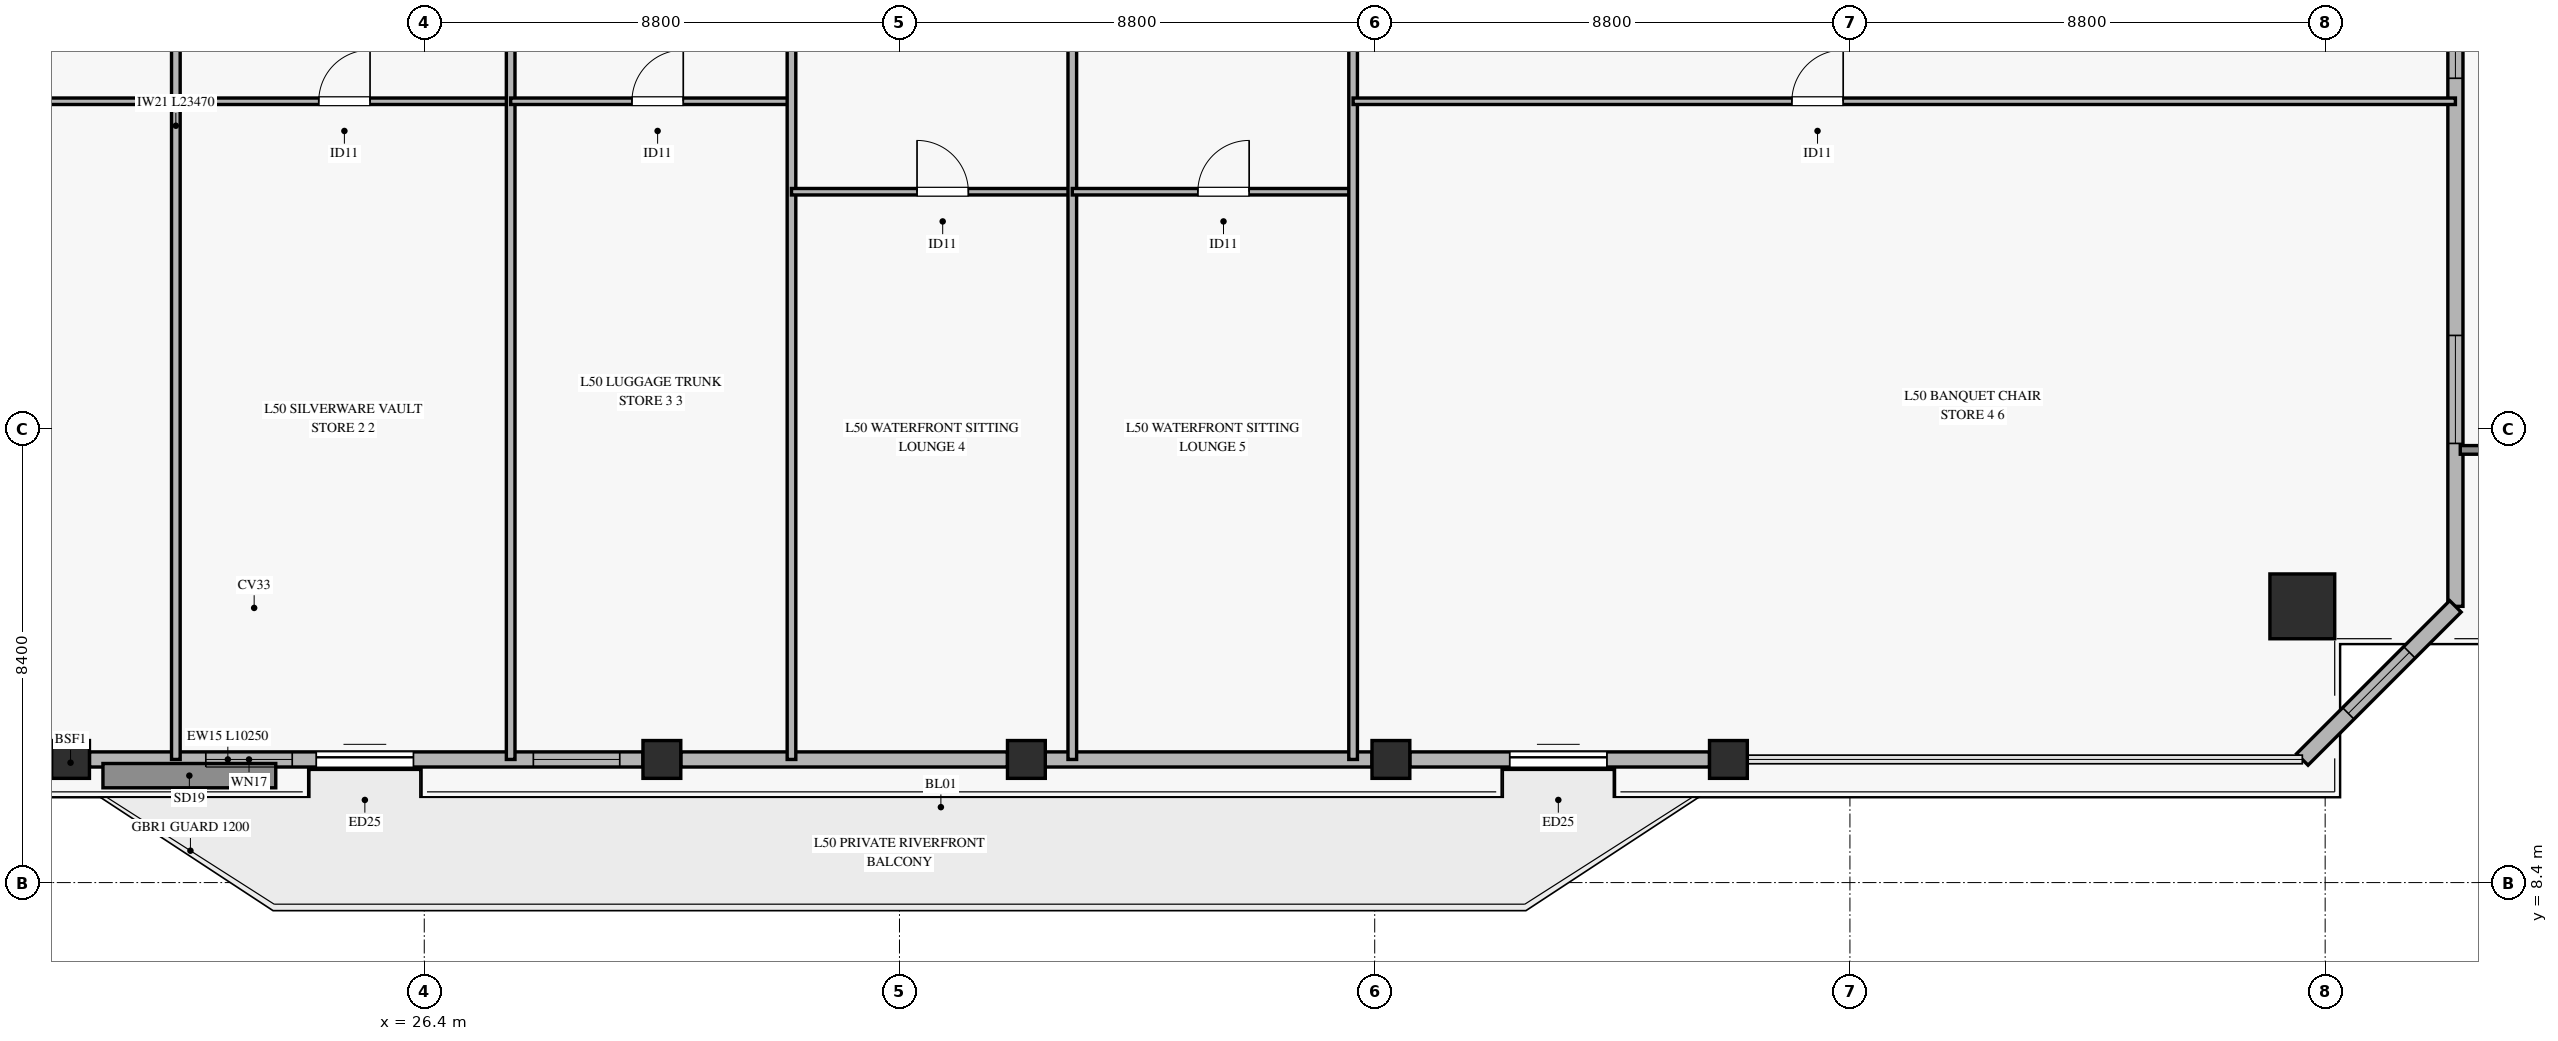
"""IFC4 building model, lengths in metres.
Left out: names, types, materials, properties, quantities, classifications, styles, units other than length and angle.
Written with IfcOpenShell. Run it as: python <this file> out.ifc"""

import sys

from ifc_helpers import new_model, si_unit, direction, frame, frame_2d, origin, origin_2d, place, context, subcontext, project, spatial, rectangle, hollow_rectangle, extrude, source, transform, mapped, element, fill, save


model = new_model("IFC4")
c1 = context("Model", 3, precision=1e-05, world=origin(), true_north=direction((0.0, 1.0)))
c2 = subcontext(c1, "Body", "Model", "MODEL_VIEW")
j1 = project(units=[si_unit("LENGTHUNIT", "METRE"), si_unit("PLANEANGLEUNIT", "RADIAN")], contexts=[c1])
p1 = place(None, origin())
s1 = spatial("IfcSite", under=j1, at=p1, CompositionType="ELEMENT")
p2 = place(p1, origin())
s2 = spatial("IfcBuilding", under=s1, at=p2, CompositionType="ELEMENT")
p3 = place(p2, frame((0.0, 0.0, 199.2)))
s3 = spatial("IfcBuildingStorey", under=s2, at=p3, CompositionType="ELEMENT", Elevation=199.2)
m1 = source(origin(), c2, "Body", "SweptSolid", [
    extrude(hollow_rectangle(XDim=1.2, YDim=1.2, WallThickness=0.055, at=origin_2d()), origin(), (0.0, 0.0, 1.0), 3.35),
])
p4 = place(p3, frame((61.177, 13.515, 0.0), z_axis=(-0.08330366427, 0.200351507504, 0.97617609731), x_axis=(-0.923364854607, -0.383923619067, 0.0)))
e1 = element("IfcColumn", 1, at=p4, inside=s3, PredefinedType="COLUMN", context=c2, shape_type="MappedRepresentation", body=[
    mapped(m1, transform((0.0, 0.0, 0.0), x_axis=(1.0, 0.0, 0.0), y_axis=(0.0, 1.0, 0.0), z_axis=(0.0, 0.0, 1.0), scale=1.0)),
])
m2 = source(origin(), c2, "Body", "SweptSolid", [
    extrude(hollow_rectangle(XDim=0.7, YDim=0.7, WallThickness=0.032, at=origin_2d()), origin(), (0.0, 0.0, 1.0), 3.345),
])
for number, where, z_axis, x_axis in (
    (2, (19.85, 10.68, 0.0), (0.0, 0.211, 0.977), (-1.0, 0.0, 0.0)),
    (3, (30.8, 10.68, 0.0), (0.0, 0.211, 0.977), (-1.0, 0.0, 0.0)),
    (4, (37.55, 10.68, 0.0), (0.0, 0.211, 0.977), (-1.0, 0.0, 0.0)),
    (5, (44.3, 10.68, 0.0), (0.0, 0.211, 0.977), (-1.0, 0.0, 0.0)),
    (6, (50.55, 10.68, 0.0), (0.0, 0.211, 0.977), (-1.0, 0.0, 0.0)),
):
    element("IfcColumn", number, at=place(p3, frame(where, z_axis=z_axis, x_axis=x_axis)), inside=s3, PredefinedType="COLUMN", context=c2, shape_type="MappedRepresentation", body=[
        mapped(m2, transform((0.0, 0.0, 0.0), x_axis=(1.0, 0.0, 0.0), y_axis=(0.0, 1.0, 0.0), z_axis=(0.0, 0.0, 1.0), scale=1.0)),
    ])
p5 = place(p3, frame((20.2, 10.68, 0.0), z_axis=(0.0, 0.0, 1.0), x_axis=(1.0, 0.0, 0.0)))
e7 = element("IfcWall", 7, at=p5, inside=s3, PredefinedType="SOLIDWALL", context=c2, shape_type="SweptSolid", body=[
    extrude(rectangle(XDim=10.25, YDim=0.28, at=frame_2d((5.125, 0.0))), origin(), (0.0, 0.0, 1.0), 2.75),
])
p6 = place(p5, frame((4.2, 0.0, 0.0)))
e8 = element("IfcOpeningElement", 8, at=p6, cuts=e7, PredefinedType="OPENING", context=c2, shape_type="SweptSolid", body=[
    extrude(rectangle(XDim=1.8, YDim=2.25, at=frame_2d((0.9, 1.125))), frame((0.0, 0.15, 0.0), z_axis=(0.0, -1.0, 0.0), x_axis=(1.0, 0.0, 0.0)), (0.0, 0.0, 1.0), 0.3),
])
p7 = place(p5, frame((2.155, 0.0, 0.45)))
e9 = element("IfcOpeningElement", 9, at=p7, cuts=e7, PredefinedType="OPENING", context=c2, shape_type="SweptSolid", body=[
    extrude(rectangle(XDim=1.6, YDim=2.0, at=frame_2d((0.8, 1.0))), frame((0.0, 0.15, 0.0), z_axis=(0.0, -1.0, 0.0), x_axis=(1.0, 0.0, 0.0)), (0.0, 0.0, 1.0), 0.3),
])
p8 = place(p5, frame((8.22, 0.0, 0.45)))
e10 = element("IfcOpeningElement", 10, at=p8, cuts=e7, PredefinedType="OPENING", context=c2, shape_type="SweptSolid", body=[
    extrude(rectangle(XDim=1.6, YDim=2.0, at=frame_2d((0.8, 1.0))), frame((0.0, 0.15, 0.0), z_axis=(0.0, -1.0, 0.0), x_axis=(1.0, 0.0, 0.0)), (0.0, 0.0, 1.0), 0.3),
])
for number, where, z_axis, x_axis in (
    (11, (31.15, 10.68, 0.0), (0.0, 0.0, 1.0), (1.0, 0.0, 0.0)),
    (12, (37.9, 10.68, 0.0), (0.0, 0.0, 1.0), (1.0, 0.0, 0.0)),
):
    element("IfcWall", number, at=place(p3, frame(where, z_axis=z_axis, x_axis=x_axis)), inside=s3, PredefinedType="SOLIDWALL", context=c2, shape_type="SweptSolid", body=[
        extrude(rectangle(XDim=6.05, YDim=0.28, at=frame_2d((3.025, 0.0))), origin(), (0.0, 0.0, 1.0), 2.75),
    ])
p9 = place(p3, frame((44.65, 10.68, 0.0), z_axis=(0.0, 0.0, 1.0), x_axis=(1.0, 0.0, 0.0)))
e13 = element("IfcWall", 13, at=p9, inside=s3, PredefinedType="SOLIDWALL", context=c2, shape_type="SweptSolid", body=[
    extrude(rectangle(XDim=5.55, YDim=0.28, at=frame_2d((2.775, 0.0))), origin(), (0.0, 0.0, 1.0), 2.75),
])
p10 = place(p9, frame((1.85, 0.0, 0.0)))
e14 = element("IfcOpeningElement", 14, at=p10, cuts=e13, PredefinedType="OPENING", context=c2, shape_type="SweptSolid", body=[
    extrude(rectangle(XDim=1.8, YDim=2.25, at=frame_2d((0.9, 1.125))), frame((0.0, 0.15, 0.0), z_axis=(0.0, -1.0, 0.0), x_axis=(1.0, 0.0, 0.0)), (0.0, 0.0, 1.0), 0.3),
])
p11 = place(p3, frame((64.012, 13.515, 0.0), z_axis=(0.0, 0.0, 1.0), x_axis=(0.0, 1.0, 0.0)))
e15 = element("IfcWall", 15, at=p11, inside=s3, PredefinedType="SOLIDWALL", context=c2, shape_type="SweptSolid", body=[
    extrude(rectangle(XDim=14.525, YDim=0.28, at=frame_2d((7.263, 0.0))), origin(), (0.0, 0.0, 1.0), 2.75),
])
p12 = place(p11, frame((3.017, 0.0, 0.45)))
e16 = element("IfcOpeningElement", 16, at=p12, cuts=e15, PredefinedType="OPENING", context=c2, shape_type="SweptSolid", body=[
    extrude(rectangle(XDim=2.0, YDim=2.0, at=frame_2d((1.0, 1.0))), frame((0.0, 0.15, 0.0), z_axis=(0.0, -1.0, 0.0), x_axis=(1.0, 0.0, 0.0)), (0.0, 0.0, 1.0), 0.3),
])
p13 = place(p11, frame((9.779, 0.0, 0.45)))
e17 = element("IfcOpeningElement", 17, at=p13, cuts=e15, PredefinedType="OPENING", context=c2, shape_type="SweptSolid", body=[
    extrude(rectangle(XDim=2.0, YDim=2.0, at=frame_2d((1.0, 1.0))), frame((0.0, 0.15, 0.0), z_axis=(0.0, -1.0, 0.0), x_axis=(1.0, 0.0, 0.0)), (0.0, 0.0, 1.0), 0.3),
])
p14 = place(p3, frame((61.177, 10.68, 0.0), z_axis=(0.0, 0.0, 1.0), x_axis=(0.707106781187, 0.707106781187, 0.0)))
e18 = element("IfcWall", 18, at=p14, inside=s3, PredefinedType="SOLIDWALL", context=c2, shape_type="SweptSolid", body=[
    extrude(rectangle(XDim=4.009, YDim=0.3, at=frame_2d((2.005, 0.0))), origin(), (0.0, 0.0, 1.0), 2.75),
])
p15 = place(p14, frame((1.205, 0.0, 0.45)))
e19 = element("IfcOpeningElement", 19, at=p15, cuts=e18, PredefinedType="OPENING", context=c2, shape_type="SweptSolid", body=[
    extrude(rectangle(XDim=1.6, YDim=2.0, at=frame_2d((0.8, 1.0))), frame((0.0, 0.16, 0.0), z_axis=(0.0, -1.0, 0.0), x_axis=(1.0, 0.0, 0.0)), (0.0, 0.0, 1.0), 0.32),
])
p16 = place(p3, frame((6.389, 22.868, 0.0), z_axis=(0.0, 0.0, 1.0), x_axis=(1.0, 0.0, 0.0)))
e20 = element("IfcWall", 20, at=p16, inside=s3, PredefinedType="PARTITIONING", context=c2, shape_type="SweptSolid", body=[
    extrude(rectangle(XDim=15.411, YDim=0.12, at=frame_2d((7.706, 0.0))), origin(), (0.0, 0.0, 1.0), 2.455),
])
p17 = place(p16, frame((6.639, 0.0, 0.0)))
e21 = element("IfcOpeningElement", 21, at=p17, cuts=e20, PredefinedType="OPENING", context=c2, shape_type="SweptSolid", body=[
    extrude(rectangle(XDim=0.95, YDim=2.1, at=frame_2d((0.475, 1.05))), frame((0.0, 0.07, 0.0), z_axis=(0.0, -1.0, 0.0), x_axis=(1.0, 0.0, 0.0)), (0.0, 0.0, 1.0), 0.14),
])
p18 = place(p3, frame((21.8, 10.68, 0.0), z_axis=(0.0, 0.0, 1.0), x_axis=(0.0, 1.0, 0.0)))
e22 = element("IfcWall", 22, at=p18, inside=s3, PredefinedType="PARTITIONING", context=c2, shape_type="SweptSolid", body=[
    extrude(rectangle(XDim=23.47, YDim=0.16, at=frame_2d((11.735, 0.0))), origin(), (0.0, 0.0, 1.0), 2.755),
])
p19 = place(p3, frame((21.8, 22.868, 0.0), z_axis=(0.0, 0.0, 1.0), x_axis=(1.0, 0.0, 0.0)))
e23 = element("IfcWall", 23, at=p19, inside=s3, PredefinedType="PARTITIONING", context=c2, shape_type="SweptSolid", body=[
    extrude(rectangle(XDim=6.2, YDim=0.12, at=frame_2d((3.1, 0.0))), origin(), (0.0, 0.0, 1.0), 3.27),
])
p20 = place(p19, frame((2.646, 0.0, 0.0)))
e24 = element("IfcOpeningElement", 24, at=p20, cuts=e23, PredefinedType="OPENING", context=c2, shape_type="SweptSolid", body=[
    extrude(rectangle(XDim=0.95, YDim=2.1, at=frame_2d((0.475, 1.05))), frame((0.0, 0.07, 0.0), z_axis=(0.0, -1.0, 0.0), x_axis=(1.0, 0.0, 0.0)), (0.0, 0.0, 1.0), 0.14),
])
p21 = place(p3, frame((28.0, 10.68, 0.0), z_axis=(0.0, 0.0, 1.0), x_axis=(0.0, 1.0, 0.0)))
e25 = element("IfcWall", 25, at=p21, inside=s3, PredefinedType="PARTITIONING", context=c2, shape_type="SweptSolid", body=[
    extrude(rectangle(XDim=23.47, YDim=0.16, at=frame_2d((11.735, 0.0))), origin(), (0.0, 0.0, 1.0), 2.755),
])
p22 = place(p3, frame((28.0, 22.868, 0.0), z_axis=(0.0, 0.0, 1.0), x_axis=(1.0, 0.0, 0.0)))
e26 = element("IfcWall", 26, at=p22, inside=s3, PredefinedType="PARTITIONING", context=c2, shape_type="SweptSolid", body=[
    extrude(rectangle(XDim=5.2, YDim=0.12, at=frame_2d((2.6, 0.0))), origin(), (0.0, 0.0, 1.0), 2.455),
])
p23 = place(p22, frame((2.246, 0.0, 0.0)))
e27 = element("IfcOpeningElement", 27, at=p23, cuts=e26, PredefinedType="OPENING", context=c2, shape_type="SweptSolid", body=[
    extrude(rectangle(XDim=0.95, YDim=2.1, at=frame_2d((0.475, 1.05))), frame((0.0, 0.07, 0.0), z_axis=(0.0, -1.0, 0.0), x_axis=(1.0, 0.0, 0.0)), (0.0, 0.0, 1.0), 0.14),
])
p24 = place(p3, frame((33.2, 10.68, 0.0), z_axis=(0.0, 0.0, 1.0), x_axis=(0.0, 1.0, 0.0)))
e28 = element("IfcWall", 28, at=p24, inside=s3, PredefinedType="PARTITIONING", context=c2, shape_type="SweptSolid", body=[
    extrude(rectangle(XDim=23.47, YDim=0.16, at=frame_2d((11.735, 0.0))), origin(), (0.0, 0.0, 1.0), 2.755),
])
p25 = place(p3, frame((33.2, 21.193, 0.0), z_axis=(0.0, 0.0, 1.0), x_axis=(1.0, 0.0, 0.0)))
e29 = element("IfcWall", 29, at=p25, inside=s3, PredefinedType="PARTITIONING", context=c2, shape_type="SweptSolid", body=[
    extrude(rectangle(XDim=5.2, YDim=0.12, at=frame_2d((2.6, 0.0))), origin(), (0.0, 0.0, 1.0), 2.455),
])
p26 = place(p25, frame((2.325, 0.0, 0.0)))
e30 = element("IfcOpeningElement", 30, at=p26, cuts=e29, PredefinedType="OPENING", context=c2, shape_type="SweptSolid", body=[
    extrude(rectangle(XDim=0.95, YDim=2.1, at=frame_2d((0.475, 1.05))), frame((0.0, 0.07, 0.0), z_axis=(0.0, -1.0, 0.0), x_axis=(1.0, 0.0, 0.0)), (0.0, 0.0, 1.0), 0.14),
])
p27 = place(p3, frame((38.4, 10.68, 0.0), z_axis=(0.0, 0.0, 1.0), x_axis=(0.0, 1.0, 0.0)))
e31 = element("IfcWall", 31, at=p27, inside=s3, PredefinedType="PARTITIONING", context=c2, shape_type="SweptSolid", body=[
    extrude(rectangle(XDim=23.47, YDim=0.16, at=frame_2d((11.735, 0.0))), origin(), (0.0, 0.0, 1.0), 2.755),
])
p28 = place(p3, frame((38.4, 21.193, 0.0), z_axis=(0.0, 0.0, 1.0), x_axis=(1.0, 0.0, 0.0)))
e32 = element("IfcWall", 32, at=p28, inside=s3, PredefinedType="PARTITIONING", context=c2, shape_type="SweptSolid", body=[
    extrude(rectangle(XDim=5.2, YDim=0.12, at=frame_2d((2.6, 0.0))), origin(), (0.0, 0.0, 1.0), 3.27),
])
p29 = place(p28, frame((2.325, 0.0, 0.0)))
e33 = element("IfcOpeningElement", 33, at=p29, cuts=e32, PredefinedType="OPENING", context=c2, shape_type="SweptSolid", body=[
    extrude(rectangle(XDim=0.95, YDim=2.1, at=frame_2d((0.475, 1.05))), frame((0.0, 0.07, 0.0), z_axis=(0.0, -1.0, 0.0), x_axis=(1.0, 0.0, 0.0)), (0.0, 0.0, 1.0), 0.14),
])
p30 = place(p3, frame((43.6, 10.68, 0.0), z_axis=(0.0, 0.0, 1.0), x_axis=(0.0, 1.0, 0.0)))
e34 = element("IfcWall", 34, at=p30, inside=s3, PredefinedType="PARTITIONING", context=c2, shape_type="SweptSolid", body=[
    extrude(rectangle(XDim=23.47, YDim=0.16, at=frame_2d((11.735, 0.0))), origin(), (0.0, 0.0, 1.0), 2.755),
])
p31 = place(p3, frame((43.6, 22.868, 0.0), z_axis=(0.0, 0.0, 1.0), x_axis=(1.0, 0.0, 0.0)))
e35 = element("IfcWall", 35, at=p31, inside=s3, PredefinedType="PARTITIONING", context=c2, shape_type="SweptSolid", body=[
    extrude(rectangle(XDim=20.412, YDim=0.12, at=frame_2d((10.206, 0.0))), origin(), (0.0, 0.0, 1.0), 2.455),
])
p32 = place(p31, frame((8.125, 0.0, 0.0)))
e36 = element("IfcOpeningElement", 36, at=p32, cuts=e35, PredefinedType="OPENING", context=c2, shape_type="SweptSolid", body=[
    extrude(rectangle(XDim=0.95, YDim=2.1, at=frame_2d((0.475, 1.05))), frame((0.0, 0.07, 0.0), z_axis=(0.0, -1.0, 0.0), x_axis=(1.0, 0.0, 0.0)), (0.0, 0.0, 1.0), 0.14),
])
m3 = source(origin(), c2, "Body", "SweptSolid", [
    extrude(rectangle(XDim=1.8, YDim=2.25, at=frame_2d((0.9, 1.125))), frame((0.0, 0.025, 0.0), z_axis=(0.0, -1.0, 0.0), x_axis=(1.0, 0.0, 0.0)), (0.0, 0.0, 1.0), 0.05),
])
p33 = place(p6, origin())
e37 = element("IfcDoor", 37, at=p33, inside=s3, OperationType="SLIDING_TO_LEFT", PredefinedType="DOOR", context=c2, shape_type="MappedRepresentation", body=[
    mapped(m3, transform((0.0, 0.0, 0.0), x_axis=(1.0, 0.0, 0.0), y_axis=(0.0, 1.0, 0.0), z_axis=(0.0, 0.0, 1.0), scale=1.0)),
])
fill(e8, e37)
m4 = source(origin(), c2, "Body", "SweptSolid", [
    extrude(rectangle(XDim=1.6, YDim=2.0, at=frame_2d((0.8, 1.0))), frame((0.0, 0.03, 0.0), z_axis=(0.0, -1.0, 0.0), x_axis=(1.0, 0.0, 0.0)), (0.0, 0.0, 1.0), 0.06),
])
p34 = place(p7, origin())
e38 = element("IfcWindow", 38, at=p34, inside=s3, PartitioningType="SINGLE_PANEL", PredefinedType="WINDOW", context=c2, shape_type="MappedRepresentation", body=[
    mapped(m4, transform((0.0, 0.0, 0.0), x_axis=(1.0, 0.0, 0.0), y_axis=(0.0, 1.0, 0.0), z_axis=(0.0, 0.0, 1.0), scale=1.0)),
])
fill(e9, e38)
p35 = place(p8, origin())
e39 = element("IfcWindow", 39, at=p35, inside=s3, PartitioningType="SINGLE_PANEL", PredefinedType="WINDOW", context=c2, shape_type="MappedRepresentation", body=[
    mapped(m4, transform((0.0, 0.0, 0.0), x_axis=(1.0, 0.0, 0.0), y_axis=(0.0, 1.0, 0.0), z_axis=(0.0, 0.0, 1.0), scale=1.0)),
])
fill(e10, e39)
p36 = place(p10, origin())
e40 = element("IfcDoor", 40, at=p36, inside=s3, OperationType="SLIDING_TO_LEFT", PredefinedType="DOOR", context=c2, shape_type="MappedRepresentation", body=[
    mapped(m3, transform((0.0, 0.0, 0.0), x_axis=(1.0, 0.0, 0.0), y_axis=(0.0, 1.0, 0.0), z_axis=(0.0, 0.0, 1.0), scale=1.0)),
])
fill(e14, e40)
m5 = source(origin(), c2, "Body", "SweptSolid", [
    extrude(rectangle(XDim=2.0, YDim=2.0, at=frame_2d((1.0, 1.0))), frame((0.0, 0.03, 0.0), z_axis=(0.0, -1.0, 0.0), x_axis=(1.0, 0.0, 0.0)), (0.0, 0.0, 1.0), 0.06),
])
p37 = place(p12, origin())
e41 = element("IfcWindow", 41, at=p37, inside=s3, PartitioningType="SINGLE_PANEL", PredefinedType="WINDOW", context=c2, shape_type="MappedRepresentation", body=[
    mapped(m5, transform((0.0, 0.0, 0.0), x_axis=(1.0, 0.0, 0.0), y_axis=(0.0, 1.0, 0.0), z_axis=(0.0, 0.0, 1.0), scale=1.0)),
])
fill(e16, e41)
p38 = place(p13, origin())
e42 = element("IfcWindow", 42, at=p38, inside=s3, PartitioningType="SINGLE_PANEL", PredefinedType="WINDOW", context=c2, shape_type="MappedRepresentation", body=[
    mapped(m5, transform((0.0, 0.0, 0.0), x_axis=(1.0, 0.0, 0.0), y_axis=(0.0, 1.0, 0.0), z_axis=(0.0, 0.0, 1.0), scale=1.0)),
])
fill(e17, e42)
p39 = place(p15, origin())
e43 = element("IfcWindow", 43, at=p39, inside=s3, PartitioningType="SINGLE_PANEL", PredefinedType="WINDOW", context=c2, shape_type="MappedRepresentation", body=[
    mapped(m4, transform((0.0, 0.0, 0.0), x_axis=(1.0, 0.0, 0.0), y_axis=(0.0, 1.0, 0.0), z_axis=(0.0, 0.0, 1.0), scale=1.0)),
])
fill(e19, e43)
m6 = source(origin(), c2, "Body", "SweptSolid", [
    extrude(rectangle(XDim=0.95, YDim=2.1, at=frame_2d((0.475, 1.05))), frame((0.0, 0.025, 0.0), z_axis=(0.0, -1.0, 0.0), x_axis=(1.0, 0.0, 0.0)), (0.0, 0.0, 1.0), 0.05),
])
p40 = place(p20, origin())
e44 = element("IfcDoor", 44, at=p40, inside=s3, OperationType="SINGLE_SWING_RIGHT", PredefinedType="DOOR", context=c2, shape_type="MappedRepresentation", body=[
    mapped(m6, transform((0.0, 0.0, 0.0), x_axis=(1.0, 0.0, 0.0), y_axis=(0.0, 1.0, 0.0), z_axis=(0.0, 0.0, 1.0), scale=1.0)),
])
fill(e24, e44)
p41 = place(p23, origin())
e45 = element("IfcDoor", 45, at=p41, inside=s3, OperationType="SINGLE_SWING_RIGHT", PredefinedType="DOOR", context=c2, shape_type="MappedRepresentation", body=[
    mapped(m6, transform((0.0, 0.0, 0.0), x_axis=(1.0, 0.0, 0.0), y_axis=(0.0, 1.0, 0.0), z_axis=(0.0, 0.0, 1.0), scale=1.0)),
])
fill(e27, e45)
p42 = place(p26, origin())
e46 = element("IfcDoor", 46, at=p42, inside=s3, OperationType="SINGLE_SWING_LEFT", PredefinedType="DOOR", context=c2, shape_type="MappedRepresentation", body=[
    mapped(m6, transform((0.0, 0.0, 0.0), x_axis=(1.0, 0.0, 0.0), y_axis=(0.0, 1.0, 0.0), z_axis=(0.0, 0.0, 1.0), scale=1.0)),
])
fill(e30, e46)
p43 = place(p29, origin())
e47 = element("IfcDoor", 47, at=p43, inside=s3, OperationType="SINGLE_SWING_RIGHT", PredefinedType="DOOR", context=c2, shape_type="MappedRepresentation", body=[
    mapped(m6, transform((0.0, 0.0, 0.0), x_axis=(1.0, 0.0, 0.0), y_axis=(0.0, 1.0, 0.0), z_axis=(0.0, 0.0, 1.0), scale=1.0)),
])
fill(e33, e47)
p44 = place(p32, origin())
e48 = element("IfcDoor", 48, at=p44, inside=s3, OperationType="SINGLE_SWING_RIGHT", PredefinedType="DOOR", context=c2, shape_type="MappedRepresentation", body=[
    mapped(m6, transform((0.0, 0.0, 0.0), x_axis=(1.0, 0.0, 0.0), y_axis=(0.0, 1.0, 0.0), z_axis=(0.0, 0.0, 1.0), scale=1.0)),
])
fill(e36, e48)
save(model, sys.argv[1])
